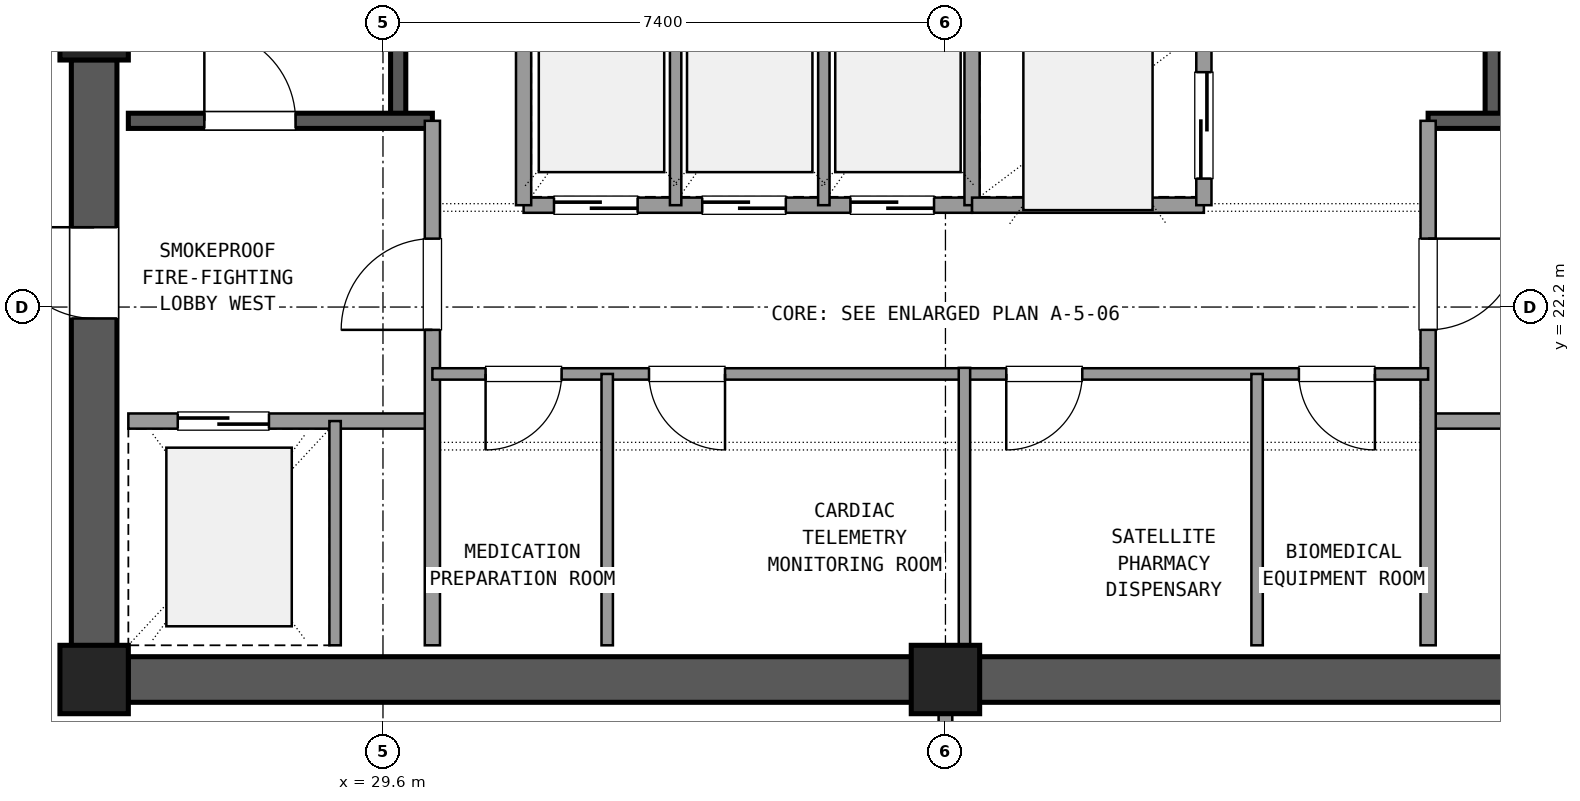
"""IFC4 building model, lengths in metres.
Left out: names, types, materials, properties, quantities, classifications, styles, units other than length and angle.
Written with IfcOpenShell. Run it as: python <this file> out.ifc"""

import sys

from ifc_helpers import new_model, si_unit, direction, frame, frame_2d, origin, origin_2d, place, context, subcontext, project, spatial, rectangle, extrude, element, fill, save


model = new_model("IFC4")
c1 = context("Model", 3, precision=1e-05, world=origin(), true_north=direction((0.0, 1.0)))
c2 = subcontext(c1, "Body", "Model", "MODEL_VIEW")
j1 = project(units=[si_unit("LENGTHUNIT", "METRE"), si_unit("PLANEANGLEUNIT", "RADIAN")], contexts=[c1])
p1 = place(None, origin())
s1 = spatial("IfcSite", under=j1, at=p1, CompositionType="ELEMENT")
p2 = place(p1, origin())
s2 = spatial("IfcBuilding", under=s1, at=p2, CompositionType="ELEMENT")
p3 = place(p2, frame((0.0, 0.0, 217.98)))
s3 = spatial("IfcBuildingStorey", under=s2, at=p3, CompositionType="ELEMENT", Elevation=217.98)
for number, where, z_axis, x_axis in (
    (1, (25.8, 17.3, 0.0), (0.0, 0.0, 1.0), (1.0, 0.0, 0.0)),
    (2, (37.0, 17.3, 0.0), (0.0, 0.0, 1.0), (1.0, 0.0, 0.0)),
    (3, (25.8, 25.9, 0.0), (0.0, 0.0, 1.0), (1.0, 0.0, 0.0)),
):
    element("IfcColumn", number, at=place(p3, frame(where, z_axis=z_axis, x_axis=x_axis)), inside=s3, PredefinedType="COLUMN", context=c2, shape_type="SweptSolid", body=[
        extrude(rectangle(XDim=0.9, YDim=0.9, at=origin_2d()), origin(), (0.0, 0.0, 1.0), 3.6),
    ])
for number, where, z_axis, x_axis in (
    (4, (26.245, 17.3, 0.0), (0.0, 0.0, 1.0), (1.0, 0.0, 0.0)),
    (5, (37.445, 17.3, 0.0), (0.0, 0.0, 1.0), (1.0, 0.0, 0.0)),
):
    element("IfcWall", number, at=place(p3, frame(where, z_axis=z_axis, x_axis=x_axis)), inside=s3, PredefinedType="SHEAR", context=c2, shape_type="SweptSolid", body=[
        extrude(rectangle(XDim=10.31, YDim=0.6, at=frame_2d((5.155, 0.0))), origin(), (0.0, 0.0, 1.0), 3.32),
    ])
p4 = place(p3, frame((25.8, 25.455, 0.0), z_axis=(0.0, 0.0, 1.0), x_axis=(0.0, -1.0, 0.0)))
e6 = element("IfcWall", 6, at=p4, inside=s3, PredefinedType="SHEAR", context=c2, shape_type="SweptSolid", body=[
    extrude(rectangle(XDim=7.71, YDim=0.6, at=frame_2d((3.855, 0.0))), origin(), (0.0, 0.0, 1.0), 3.32),
])
p5 = place(p4, frame((2.205, 0.0, 0.0)))
e7 = element("IfcOpeningElement", 7, at=p5, cuts=e6, PredefinedType="OPENING", context=c2, shape_type="SweptSolid", body=[
    extrude(rectangle(XDim=1.2, YDim=2.15, at=frame_2d((0.6, 1.075))), frame((0.0, 0.31, 0.0), z_axis=(0.0, -1.0, 0.0), x_axis=(1.0, 0.0, 0.0)), (0.0, 0.0, 1.0), 0.62),
])
p6 = place(p3, frame((29.8, 24.65, 0.0), z_axis=(0.0, 0.0, 1.0), x_axis=(0.0, 1.0, 0.0)))
e8 = element("IfcWall", 8, at=p6, inside=s3, PredefinedType="SHEAR", context=c2, shape_type="SweptSolid", body=[
    extrude(rectangle(XDim=9.4, YDim=0.2, at=frame_2d((4.7, 0.0))), origin(), (0.0, 0.0, 1.0), 3.32),
])
p7 = place(p3, frame((26.25, 24.65, 0.0), z_axis=(0.0, 0.0, 1.0), x_axis=(1.0, 0.0, 0.0)))
e9 = element("IfcWall", 9, at=p7, inside=s3, PredefinedType="SHEAR", context=c2, shape_type="SweptSolid", body=[
    extrude(rectangle(XDim=4.0, YDim=0.2, at=frame_2d((2.0, 0.0))), origin(), (0.0, 0.0, 1.0), 3.32),
])
p8 = place(p7, frame((1.0, 0.0, 0.0)))
e10 = element("IfcOpeningElement", 10, at=p8, cuts=e9, PredefinedType="OPENING", context=c2, shape_type="SweptSolid", body=[
    extrude(rectangle(XDim=1.2, YDim=2.15, at=frame_2d((0.6, 1.075))), frame((0.0, 0.11, 0.0), z_axis=(0.0, -1.0, 0.0), x_axis=(1.0, 0.0, 0.0)), (0.0, 0.0, 1.0), 0.22),
])
p9 = place(p3, frame((44.2, 24.65, 0.0), z_axis=(0.0, 0.0, 1.0), x_axis=(0.0, 1.0, 0.0)))
e11 = element("IfcWall", 11, at=p9, inside=s3, PredefinedType="SHEAR", context=c2, shape_type="SweptSolid", body=[
    extrude(rectangle(XDim=9.4, YDim=0.2, at=frame_2d((4.7, 0.0))), origin(), (0.0, 0.0, 1.0), 3.32),
])
p10 = place(p3, frame((43.35, 24.65, 0.0), z_axis=(0.0, 0.0, 1.0), x_axis=(1.0, 0.0, 0.0)))
e12 = element("IfcWall", 12, at=p10, inside=s3, PredefinedType="SHEAR", context=c2, shape_type="SweptSolid", body=[
    extrude(rectangle(XDim=4.4, YDim=0.2, at=frame_2d((2.2, 0.0))), origin(), (0.0, 0.0, 1.0), 3.32),
])
p11 = place(p10, frame((2.0, 0.0, 0.0)))
e13 = element("IfcOpeningElement", 13, at=p11, cuts=e12, PredefinedType="OPENING", context=c2, shape_type="SweptSolid", body=[
    extrude(rectangle(XDim=1.2, YDim=2.15, at=frame_2d((0.6, 1.075))), frame((0.0, 0.11, 0.0), z_axis=(0.0, -1.0, 0.0), x_axis=(1.0, 0.0, 0.0)), (0.0, 0.0, 1.0), 0.22),
])
p12 = place(p3, frame((26.25, 20.7, 0.0), z_axis=(0.0, 0.0, 1.0), x_axis=(1.0, 0.0, 0.0)))
e14 = element("IfcWall", 14, at=p12, inside=s3, PredefinedType="SOLIDWALL", context=c2, shape_type="SweptSolid", body=[
    extrude(rectangle(XDim=4.0, YDim=0.2, at=frame_2d((2.0, 0.0))), origin(), (0.0, 0.0, 1.0), 2.61),
])
p13 = place(p12, frame((0.65, 0.0, 0.0)))
e15 = element("IfcOpeningElement", 15, at=p13, cuts=e14, PredefinedType="OPENING", context=c2, shape_type="SweptSolid", body=[
    extrude(rectangle(XDim=1.2, YDim=2.15, at=frame_2d((0.6, 1.075))), frame((0.0, 0.11, 0.0), z_axis=(0.0, -1.0, 0.0), x_axis=(1.0, 0.0, 0.0)), (0.0, 0.0, 1.0), 0.22),
])
p14 = place(p3, frame((30.25, 17.75, 0.0), z_axis=(0.0, 0.0, 1.0), x_axis=(0.0, 1.0, 0.0)))
e16 = element("IfcWall", 16, at=p14, inside=s3, PredefinedType="SOLIDWALL", context=c2, shape_type="SweptSolid", body=[
    extrude(rectangle(XDim=6.9, YDim=0.2, at=frame_2d((3.45, 0.0))), origin(), (0.0, 0.0, 1.0), 2.61),
])
p15 = place(p14, frame((4.15, 0.0, 0.0)))
e17 = element("IfcOpeningElement", 17, at=p15, cuts=e16, PredefinedType="OPENING", context=c2, shape_type="SweptSolid", body=[
    extrude(rectangle(XDim=1.2, YDim=2.15, at=frame_2d((0.6, 1.075))), frame((0.0, 0.11, 0.0), z_axis=(0.0, -1.0, 0.0), x_axis=(1.0, 0.0, 0.0)), (0.0, 0.0, 1.0), 0.22),
])
p16 = place(p3, frame((28.97, 17.75, 0.0), z_axis=(0.0, 0.0, 1.0), x_axis=(0.0, 1.0, 0.0)))
e18 = element("IfcWall", 18, at=p16, inside=s3, PredefinedType="PARTITIONING", context=c2, shape_type="SweptSolid", body=[
    extrude(rectangle(XDim=2.95, YDim=0.15, at=frame_2d((1.475, 0.0))), origin(), (0.0, 0.0, 1.0), 2.61),
])
p17 = place(p3, frame((43.35, 20.7, 0.0), z_axis=(0.0, 0.0, 1.0), x_axis=(1.0, 0.0, 0.0)))
e19 = element("IfcWall", 19, at=p17, inside=s3, PredefinedType="SOLIDWALL", context=c2, shape_type="SweptSolid", body=[
    extrude(rectangle(XDim=4.4, YDim=0.2, at=frame_2d((2.2, 0.0))), origin(), (0.0, 0.0, 1.0), 2.61),
])
p18 = place(p17, frame((2.35, 0.0, 0.0)))
e20 = element("IfcOpeningElement", 20, at=p18, cuts=e19, PredefinedType="OPENING", context=c2, shape_type="SweptSolid", body=[
    extrude(rectangle(XDim=1.2, YDim=2.15, at=frame_2d((0.6, 1.075))), frame((0.0, 0.11, 0.0), z_axis=(0.0, -1.0, 0.0), x_axis=(1.0, 0.0, 0.0)), (0.0, 0.0, 1.0), 0.22),
])
p19 = place(p3, frame((43.35, 17.75, 0.0), z_axis=(0.0, 0.0, 1.0), x_axis=(0.0, 1.0, 0.0)))
e21 = element("IfcWall", 21, at=p19, inside=s3, PredefinedType="SOLIDWALL", context=c2, shape_type="SweptSolid", body=[
    extrude(rectangle(XDim=6.9, YDim=0.2, at=frame_2d((3.45, 0.0))), origin(), (0.0, 0.0, 1.0), 2.61),
])
p20 = place(p19, frame((4.15, 0.0, 0.0)))
e22 = element("IfcOpeningElement", 22, at=p20, cuts=e21, PredefinedType="OPENING", context=c2, shape_type="SweptSolid", body=[
    extrude(rectangle(XDim=1.2, YDim=2.15, at=frame_2d((0.6, 1.075))), frame((0.0, 0.11, 0.0), z_axis=(0.0, -1.0, 0.0), x_axis=(1.0, 0.0, 0.0)), (0.0, 0.0, 1.0), 0.22),
])
p21 = place(p3, frame((30.25, 21.32, 0.0), z_axis=(0.0, 0.0, 1.0), x_axis=(1.0, 0.0, 0.0)))
e23 = element("IfcWall", 23, at=p21, inside=s3, PredefinedType="PARTITIONING", context=c2, shape_type="SweptSolid", body=[
    extrude(rectangle(XDim=7.0, YDim=0.15, at=frame_2d((3.5, 0.0))), origin(), (0.0, 0.0, 1.0), 2.61),
])
p22 = place(p21, frame((0.7, 0.0, 0.0)))
e24 = element("IfcOpeningElement", 24, at=p22, cuts=e23, PredefinedType="OPENING", context=c2, shape_type="SweptSolid", body=[
    extrude(rectangle(XDim=1.0, YDim=2.15, at=frame_2d((0.5, 1.075))), frame((0.0, 0.085, 0.0), z_axis=(0.0, -1.0, 0.0), x_axis=(1.0, 0.0, 0.0)), (0.0, 0.0, 1.0), 0.17),
])
p23 = place(p21, frame((2.85, 0.0, 0.0)))
e25 = element("IfcOpeningElement", 25, at=p23, cuts=e23, PredefinedType="OPENING", context=c2, shape_type="SweptSolid", body=[
    extrude(rectangle(XDim=1.0, YDim=2.15, at=frame_2d((0.5, 1.075))), frame((0.0, 0.085, 0.0), z_axis=(0.0, -1.0, 0.0), x_axis=(1.0, 0.0, 0.0)), (0.0, 0.0, 1.0), 0.17),
])
p24 = place(p3, frame((32.55, 17.75, 0.0), z_axis=(0.0, 0.0, 1.0), x_axis=(0.0, 1.0, 0.0)))
e26 = element("IfcWall", 26, at=p24, inside=s3, PredefinedType="PARTITIONING", context=c2, shape_type="SweptSolid", body=[
    extrude(rectangle(XDim=3.57, YDim=0.15, at=frame_2d((1.785, 0.0))), origin(), (0.0, 0.0, 1.0), 2.61),
])
p25 = place(p3, frame((37.25, 21.32, 0.0), z_axis=(0.0, 0.0, 1.0), x_axis=(1.0, 0.0, 0.0)))
e27 = element("IfcWall", 27, at=p25, inside=s3, PredefinedType="PARTITIONING", context=c2, shape_type="SweptSolid", body=[
    extrude(rectangle(XDim=6.1, YDim=0.15, at=frame_2d((3.05, 0.0))), origin(), (0.0, 0.0, 1.0), 2.61),
])
p26 = place(p25, frame((0.55, 0.0, 0.0)))
e28 = element("IfcOpeningElement", 28, at=p26, cuts=e27, PredefinedType="OPENING", context=c2, shape_type="SweptSolid", body=[
    extrude(rectangle(XDim=1.0, YDim=2.15, at=frame_2d((0.5, 1.075))), frame((0.0, 0.085, 0.0), z_axis=(0.0, -1.0, 0.0), x_axis=(1.0, 0.0, 0.0)), (0.0, 0.0, 1.0), 0.17),
])
p27 = place(p25, frame((4.4, 0.0, 0.0)))
e29 = element("IfcOpeningElement", 29, at=p27, cuts=e27, PredefinedType="OPENING", context=c2, shape_type="SweptSolid", body=[
    extrude(rectangle(XDim=1.0, YDim=2.15, at=frame_2d((0.5, 1.075))), frame((0.0, 0.085, 0.0), z_axis=(0.0, -1.0, 0.0), x_axis=(1.0, 0.0, 0.0)), (0.0, 0.0, 1.0), 0.17),
])
p28 = place(p3, frame((41.1, 17.75, 0.0), z_axis=(0.0, 0.0, 1.0), x_axis=(0.0, 1.0, 0.0)))
e30 = element("IfcWall", 30, at=p28, inside=s3, PredefinedType="PARTITIONING", context=c2, shape_type="SweptSolid", body=[
    extrude(rectangle(XDim=3.57, YDim=0.15, at=frame_2d((1.785, 0.0))), origin(), (0.0, 0.0, 1.0), 2.61),
])
p29 = place(p3, frame((37.25, 17.75, 0.0), z_axis=(0.0, 0.0, 1.0), x_axis=(0.0, 1.0, 0.0)))
e31 = element("IfcWall", 31, at=p29, inside=s3, PredefinedType="PARTITIONING", context=c2, shape_type="SweptSolid", body=[
    extrude(rectangle(XDim=3.65, YDim=0.15, at=frame_2d((1.825, 0.0))), origin(), (0.0, 0.0, 1.0), 2.61),
])
p30 = place(p3, frame((31.45, 23.54, 0.0), z_axis=(0.0, 0.0, 1.0), x_axis=(1.0, 0.0, 0.0)))
e32 = element("IfcWall", 32, at=p30, inside=s3, PredefinedType="SOLIDWALL", context=c2, shape_type="SweptSolid", body=[
    extrude(rectangle(XDim=5.9, YDim=0.2, at=frame_2d((2.95, 0.0))), origin(), (0.0, 0.0, 1.0), 2.61),
])
p31 = place(p30, frame((0.4, 0.0, 0.0)))
e33 = element("IfcOpeningElement", 33, at=p31, cuts=e32, PredefinedType="OPENING", context=c2, shape_type="SweptSolid", body=[
    extrude(rectangle(XDim=1.1, YDim=2.15, at=frame_2d((0.55, 1.075))), frame((0.0, 0.11, 0.0), z_axis=(0.0, -1.0, 0.0), x_axis=(1.0, 0.0, 0.0)), (0.0, 0.0, 1.0), 0.22),
])
p32 = place(p30, frame((2.35, 0.0, 0.0)))
e34 = element("IfcOpeningElement", 34, at=p32, cuts=e32, PredefinedType="OPENING", context=c2, shape_type="SweptSolid", body=[
    extrude(rectangle(XDim=1.1, YDim=2.15, at=frame_2d((0.55, 1.075))), frame((0.0, 0.11, 0.0), z_axis=(0.0, -1.0, 0.0), x_axis=(1.0, 0.0, 0.0)), (0.0, 0.0, 1.0), 0.22),
])
p33 = place(p30, frame((4.3, 0.0, 0.0)))
e35 = element("IfcOpeningElement", 35, at=p33, cuts=e32, PredefinedType="OPENING", context=c2, shape_type="SweptSolid", body=[
    extrude(rectangle(XDim=1.1, YDim=2.15, at=frame_2d((0.55, 1.075))), frame((0.0, 0.11, 0.0), z_axis=(0.0, -1.0, 0.0), x_axis=(1.0, 0.0, 0.0)), (0.0, 0.0, 1.0), 0.22),
])
p34 = place(p3, frame((31.45, 23.54, 0.0), z_axis=(0.0, 0.0, 1.0), x_axis=(0.0, 1.0, 0.0)))
e36 = element("IfcWall", 36, at=p34, inside=s3, PredefinedType="SOLIDWALL", context=c2, shape_type="SweptSolid", body=[
    extrude(rectangle(XDim=2.81, YDim=0.2, at=frame_2d((1.405, 0.0))), origin(), (0.0, 0.0, 1.0), 2.61),
])
for number, where, z_axis, x_axis in (
    (37, (33.45, 23.54, 0.0), (0.0, 0.0, 1.0), (0.0, 1.0, 0.0)),
    (38, (35.4, 23.54, 0.0), (0.0, 0.0, 1.0), (0.0, 1.0, 0.0)),
):
    element("IfcWall", number, at=place(p3, frame(where, z_axis=z_axis, x_axis=x_axis)), inside=s3, PredefinedType="PARTITIONING", context=c2, shape_type="SweptSolid", body=[
        extrude(rectangle(XDim=2.81, YDim=0.15, at=frame_2d((1.405, 0.0))), origin(), (0.0, 0.0, 1.0), 2.61),
    ])
p35 = place(p3, frame((37.35, 23.54, 0.0), z_axis=(0.0, 0.0, 1.0), x_axis=(0.0, 1.0, 0.0)))
e39 = element("IfcWall", 39, at=p35, inside=s3, PredefinedType="SOLIDWALL", context=c2, shape_type="SweptSolid", body=[
    extrude(rectangle(XDim=6.82, YDim=0.2, at=frame_2d((3.41, 0.0))), origin(), (0.0, 0.0, 1.0), 2.61),
])
p36 = place(p3, frame((37.35, 23.54, 0.0), z_axis=(0.0, 0.0, 1.0), x_axis=(1.0, 0.0, 0.0)))
e40 = element("IfcWall", 40, at=p36, inside=s3, PredefinedType="SOLIDWALL", context=c2, shape_type="SweptSolid", body=[
    extrude(rectangle(XDim=3.05, YDim=0.2, at=frame_2d((1.525, 0.0))), origin(), (0.0, 0.0, 1.0), 2.61),
])
p37 = place(p3, frame((40.4, 23.54, 0.0), z_axis=(0.0, 0.0, 1.0), x_axis=(0.0, 1.0, 0.0)))
e41 = element("IfcWall", 41, at=p37, inside=s3, PredefinedType="SOLIDWALL", context=c2, shape_type="SweptSolid", body=[
    extrude(rectangle(XDim=6.82, YDim=0.2, at=frame_2d((3.41, 0.0))), origin(), (0.0, 0.0, 1.0), 2.61),
])
p38 = place(p37, frame((0.35, 0.0, 0.0)))
e42 = element("IfcOpeningElement", 42, at=p38, cuts=e41, PredefinedType="OPENING", context=c2, shape_type="SweptSolid", body=[
    extrude(rectangle(XDim=1.4, YDim=2.2, at=frame_2d((0.7, 1.1))), frame((0.0, 0.11, 0.0), z_axis=(0.0, -1.0, 0.0), x_axis=(1.0, 0.0, 0.0)), (0.0, 0.0, 1.0), 0.22),
])
p39 = place(p37, frame((2.65, 0.0, 0.0)))
e43 = element("IfcOpeningElement", 43, at=p39, cuts=e41, PredefinedType="OPENING", context=c2, shape_type="SweptSolid", body=[
    extrude(rectangle(XDim=1.4, YDim=2.2, at=frame_2d((0.7, 1.1))), frame((0.0, 0.11, 0.0), z_axis=(0.0, -1.0, 0.0), x_axis=(1.0, 0.0, 0.0)), (0.0, 0.0, 1.0), 0.22),
])
p40 = place(p37, frame((4.85, 0.0, 0.0)))
e44 = element("IfcOpeningElement", 44, at=p40, cuts=e41, PredefinedType="OPENING", context=c2, shape_type="SweptSolid", body=[
    extrude(rectangle(XDim=1.4, YDim=2.2, at=frame_2d((0.7, 1.1))), frame((0.0, 0.11, 0.0), z_axis=(0.0, -1.0, 0.0), x_axis=(1.0, 0.0, 0.0)), (0.0, 0.0, 1.0), 0.22),
])
p41 = place(p3, frame((37.0, 14.15, 0.0), z_axis=(0.0, 0.0, 1.0), x_axis=(0.0, 1.0, 0.0)))
e45 = element("IfcWall", 45, at=p41, inside=s3, PredefinedType="PARTITIONING", context=c2, shape_type="SweptSolid", body=[
    extrude(rectangle(XDim=2.7, YDim=0.18, at=frame_2d((1.35, 0.0))), origin(), (0.0, 0.0, 1.0), 2.61),
])
p42 = place(p41, frame((0.35, 0.0, 0.0)))
e46 = element("IfcOpeningElement", 46, at=p42, cuts=e45, PredefinedType="OPENING", context=c2, shape_type="SweptSolid", body=[
    extrude(rectangle(XDim=2.0, YDim=2.2, at=frame_2d((1.0, 1.1))), frame((0.0, 0.1, 0.0), z_axis=(0.0, -1.0, 0.0), x_axis=(1.0, 0.0, 0.0)), (0.0, 0.0, 1.0), 0.2),
])
p43 = place(p8, origin())
e47 = element("IfcDoor", 47, at=p43, inside=s3, OperationType="SINGLE_SWING_LEFT", PredefinedType="DOOR", context=c2, shape_type="SweptSolid", body=[
    extrude(rectangle(XDim=1.2, YDim=2.15, at=frame_2d((0.6, 1.075))), frame((0.0, 0.025, 0.0), z_axis=(0.0, -1.0, 0.0), x_axis=(1.0, 0.0, 0.0)), (0.0, 0.0, 1.0), 0.05),
])
fill(e10, e47)
p44 = place(p13, origin())
e48 = element("IfcDoor", 48, at=p44, inside=s3, OperationType="SLIDING_TO_LEFT", PredefinedType="DOOR", context=c2, shape_type="SweptSolid", body=[
    extrude(rectangle(XDim=1.2, YDim=2.15, at=frame_2d((0.6, 1.075))), frame((0.0, 0.025, 0.0), z_axis=(0.0, -1.0, 0.0), x_axis=(1.0, 0.0, 0.0)), (0.0, 0.0, 1.0), 0.05),
])
fill(e15, e48)
p45 = place(p15, origin())
e49 = element("IfcDoor", 49, at=p45, inside=s3, OperationType="SINGLE_SWING_LEFT", PredefinedType="DOOR", context=c2, shape_type="SweptSolid", body=[
    extrude(rectangle(XDim=1.2, YDim=2.15, at=frame_2d((0.6, 1.075))), frame((0.0, 0.025, 0.0), z_axis=(0.0, -1.0, 0.0), x_axis=(1.0, 0.0, 0.0)), (0.0, 0.0, 1.0), 0.05),
])
fill(e17, e49)
p46 = place(p20, frame((1.2, 0.0, 0.0), z_axis=(0.0, 0.0, 1.0), x_axis=(-1.0, 0.0, 0.0)))
e50 = element("IfcDoor", 50, at=p46, inside=s3, OperationType="SINGLE_SWING_RIGHT", PredefinedType="DOOR", context=c2, shape_type="SweptSolid", body=[
    extrude(rectangle(XDim=1.2, YDim=2.15, at=frame_2d((0.6, 1.075))), frame((0.0, 0.025, 0.0), z_axis=(0.0, -1.0, 0.0), x_axis=(1.0, 0.0, 0.0)), (0.0, 0.0, 1.0), 0.05),
])
fill(e22, e50)
p47 = place(p5, frame((1.2, 0.0, 0.0), z_axis=(0.0, 0.0, 1.0), x_axis=(-1.0, 0.0, 0.0)))
e51 = element("IfcDoor", 51, at=p47, inside=s3, OperationType="SINGLE_SWING_LEFT", PredefinedType="DOOR", context=c2, shape_type="SweptSolid", body=[
    extrude(rectangle(XDim=1.2, YDim=2.15, at=frame_2d((0.6, 1.075))), frame((0.0, 0.025, 0.0), z_axis=(0.0, -1.0, 0.0), x_axis=(1.0, 0.0, 0.0)), (0.0, 0.0, 1.0), 0.05),
])
fill(e7, e51)
p48 = place(p22, frame((1.0, 0.0, 0.0), z_axis=(0.0, 0.0, 1.0), x_axis=(-1.0, 0.0, 0.0)))
e52 = element("IfcDoor", 52, at=p48, inside=s3, OperationType="SINGLE_SWING_LEFT", PredefinedType="DOOR", context=c2, shape_type="SweptSolid", body=[
    extrude(rectangle(XDim=1.0, YDim=2.15, at=frame_2d((0.5, 1.075))), frame((0.0, 0.025, 0.0), z_axis=(0.0, -1.0, 0.0), x_axis=(1.0, 0.0, 0.0)), (0.0, 0.0, 1.0), 0.05),
])
fill(e24, e52)
p49 = place(p23, frame((1.0, 0.0, 0.0), z_axis=(0.0, 0.0, 1.0), x_axis=(-1.0, 0.0, 0.0)))
e53 = element("IfcDoor", 53, at=p49, inside=s3, OperationType="SINGLE_SWING_RIGHT", PredefinedType="DOOR", context=c2, shape_type="SweptSolid", body=[
    extrude(rectangle(XDim=1.0, YDim=2.15, at=frame_2d((0.5, 1.075))), frame((0.0, 0.025, 0.0), z_axis=(0.0, -1.0, 0.0), x_axis=(1.0, 0.0, 0.0)), (0.0, 0.0, 1.0), 0.05),
])
fill(e25, e53)
p50 = place(p26, frame((1.0, 0.0, 0.0), z_axis=(0.0, 0.0, 1.0), x_axis=(-1.0, 0.0, 0.0)))
e54 = element("IfcDoor", 54, at=p50, inside=s3, OperationType="SINGLE_SWING_LEFT", PredefinedType="DOOR", context=c2, shape_type="SweptSolid", body=[
    extrude(rectangle(XDim=1.0, YDim=2.15, at=frame_2d((0.5, 1.075))), frame((0.0, 0.025, 0.0), z_axis=(0.0, -1.0, 0.0), x_axis=(1.0, 0.0, 0.0)), (0.0, 0.0, 1.0), 0.05),
])
fill(e28, e54)
p51 = place(p27, frame((1.0, 0.0, 0.0), z_axis=(0.0, 0.0, 1.0), x_axis=(-1.0, 0.0, 0.0)))
e55 = element("IfcDoor", 55, at=p51, inside=s3, OperationType="SINGLE_SWING_RIGHT", PredefinedType="DOOR", context=c2, shape_type="SweptSolid", body=[
    extrude(rectangle(XDim=1.0, YDim=2.15, at=frame_2d((0.5, 1.075))), frame((0.0, 0.025, 0.0), z_axis=(0.0, -1.0, 0.0), x_axis=(1.0, 0.0, 0.0)), (0.0, 0.0, 1.0), 0.05),
])
fill(e29, e55)
p52 = place(p31, origin())
e56 = element("IfcDoor", 56, at=p52, inside=s3, OperationType="SLIDING_TO_RIGHT", PredefinedType="DOOR", context=c2, shape_type="SweptSolid", body=[
    extrude(rectangle(XDim=1.1, YDim=2.15, at=frame_2d((0.55, 1.075))), frame((0.0, 0.025, 0.0), z_axis=(0.0, -1.0, 0.0), x_axis=(1.0, 0.0, 0.0)), (0.0, 0.0, 1.0), 0.05),
])
fill(e33, e56)
p53 = place(p32, origin())
e57 = element("IfcDoor", 57, at=p53, inside=s3, OperationType="SLIDING_TO_RIGHT", PredefinedType="DOOR", context=c2, shape_type="SweptSolid", body=[
    extrude(rectangle(XDim=1.1, YDim=2.15, at=frame_2d((0.55, 1.075))), frame((0.0, 0.025, 0.0), z_axis=(0.0, -1.0, 0.0), x_axis=(1.0, 0.0, 0.0)), (0.0, 0.0, 1.0), 0.05),
])
fill(e34, e57)
p54 = place(p33, origin())
e58 = element("IfcDoor", 58, at=p54, inside=s3, OperationType="SLIDING_TO_RIGHT", PredefinedType="DOOR", context=c2, shape_type="SweptSolid", body=[
    extrude(rectangle(XDim=1.1, YDim=2.15, at=frame_2d((0.55, 1.075))), frame((0.0, 0.025, 0.0), z_axis=(0.0, -1.0, 0.0), x_axis=(1.0, 0.0, 0.0)), (0.0, 0.0, 1.0), 0.05),
])
fill(e35, e58)
p55 = place(p38, origin())
e59 = element("IfcDoor", 59, at=p55, inside=s3, OperationType="SLIDING_TO_LEFT", PredefinedType="DOOR", context=c2, shape_type="SweptSolid", body=[
    extrude(rectangle(XDim=1.4, YDim=2.2, at=frame_2d((0.7, 1.1))), frame((0.0, 0.025, 0.0), z_axis=(0.0, -1.0, 0.0), x_axis=(1.0, 0.0, 0.0)), (0.0, 0.0, 1.0), 0.05),
])
fill(e42, e59)
save(model, sys.argv[1])
